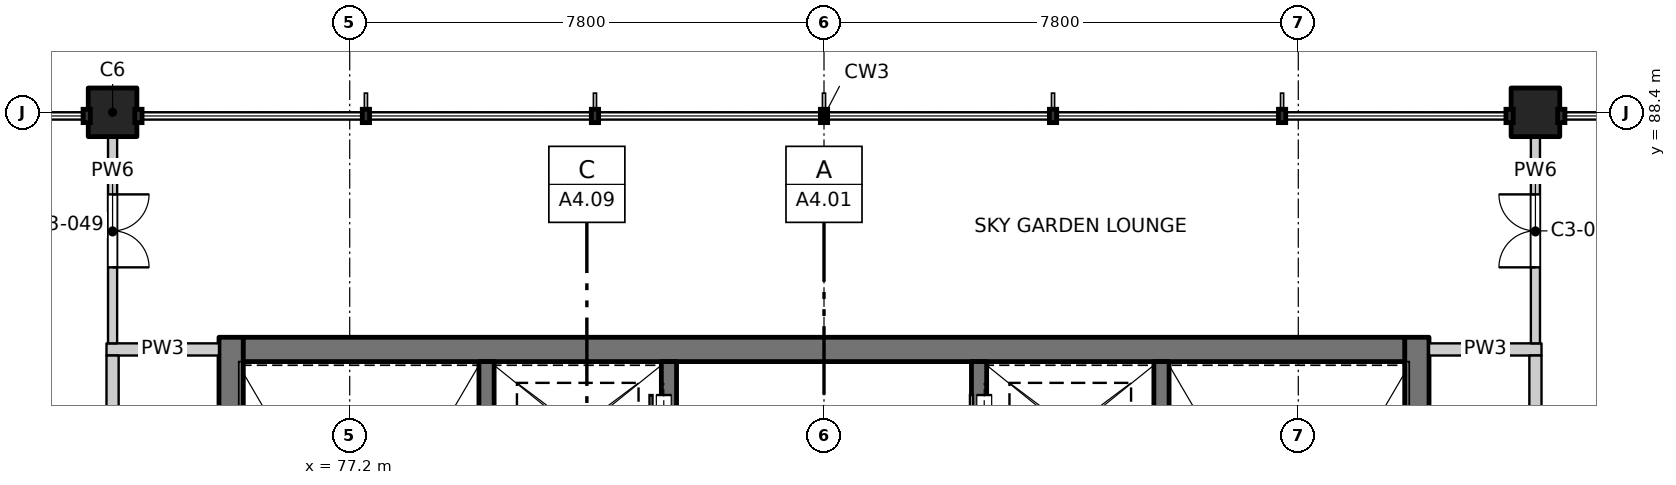
"""IFC4 building model, lengths in metres.
Left out: names, types, materials, properties, quantities, classifications, styles, units other than length and angle.
Written with IfcOpenShell. Run it as: python <this file> out.ifc"""

import sys

from ifc_helpers import new_model, si_unit, direction, frame, frame_2d, origin, origin_2d, place, context, subcontext, project, spatial, rectangle, extrude, element, fill, save


model = new_model("IFC4")
c1 = context("Model", 3, precision=1e-05, world=origin(), true_north=direction((0.0, 1.0)))
c2 = subcontext(c1, "Body", "Model", "MODEL_VIEW")
j1 = project(units=[si_unit("LENGTHUNIT", "METRE"), si_unit("PLANEANGLEUNIT", "RADIAN")], contexts=[c1])
p1 = place(None, origin())
s1 = spatial("IfcSite", under=j1, at=p1, CompositionType="ELEMENT")
p2 = place(p1, origin())
s2 = spatial("IfcBuilding", under=s1, at=p2, CompositionType="ELEMENT")
p3 = place(p2, frame((0.0, 0.0, 200.7)))
s3 = spatial("IfcBuildingStorey", under=s2, at=p3, CompositionType="ELEMENT", Elevation=200.7)
for number, where, z_axis, x_axis in (
    (1, (73.3, 88.4, -0.25), (0.0, 0.0, 1.0), (1.0, 0.0, 0.0)),
    (2, (96.7, 88.4, -0.25), (0.0, 0.0, 1.0), (1.0, 0.0, 0.0)),
):
    element("IfcColumn", number, at=place(p3, frame(where, z_axis=z_axis, x_axis=x_axis)), inside=s3, PredefinedType="COLUMN", context=c2, shape_type="SweptSolid", body=[
        extrude(rectangle(XDim=0.8, YDim=0.8, at=origin_2d()), origin(), (0.0, 0.0, 1.0), 3.4),
    ])
p4 = place(p3, frame((75.25, 77.3, -0.25), z_axis=(0.0, 0.0, 1.0), x_axis=(0.0, 1.0, 0.0)))
e3 = element("IfcWall", 3, at=p4, inside=s3, PredefinedType="SOLIDWALL", context=c2, shape_type="SweptSolid", body=[
    extrude(rectangle(XDim=7.4, YDim=0.4, at=frame_2d((3.7, 0.0))), origin(), (0.0, 0.0, 1.0), 3.4),
])
p5 = place(p4, frame((0.3, 0.0, 0.25)))
e4 = element("IfcOpeningElement", 4, at=p5, cuts=e3, PredefinedType="OPENING", context=c2, shape_type="SweptSolid", body=[
    extrude(rectangle(XDim=1.2, YDim=2.1, at=frame_2d((0.6, 1.05))), frame((0.0, 0.21, 0.0), z_axis=(0.0, -1.0, 0.0), x_axis=(1.0, 0.0, 0.0)), (0.0, 0.0, 1.0), 0.42),
])
p6 = place(p3, frame((94.75, 77.3, -0.25), z_axis=(0.0, 0.0, 1.0), x_axis=(0.0, 1.0, 0.0)))
e5 = element("IfcWall", 5, at=p6, inside=s3, PredefinedType="SOLIDWALL", context=c2, shape_type="SweptSolid", body=[
    extrude(rectangle(XDim=7.4, YDim=0.4, at=frame_2d((3.7, 0.0))), origin(), (0.0, 0.0, 1.0), 3.4),
])
p7 = place(p6, frame((0.3, 0.0, 0.25)))
e6 = element("IfcOpeningElement", 6, at=p7, cuts=e5, PredefinedType="OPENING", context=c2, shape_type="SweptSolid", body=[
    extrude(rectangle(XDim=1.2, YDim=2.1, at=frame_2d((0.6, 1.05))), frame((0.0, 0.21, 0.0), z_axis=(0.0, -1.0, 0.0), x_axis=(1.0, 0.0, 0.0)), (0.0, 0.0, 1.0), 0.42),
])
p8 = place(p3, frame((75.45, 84.5, -0.25), z_axis=(0.0, 0.0, 1.0), x_axis=(1.0, 0.0, 0.0)))
e7 = element("IfcWall", 7, at=p8, inside=s3, PredefinedType="SOLIDWALL", context=c2, shape_type="SweptSolid", body=[
    extrude(rectangle(XDim=19.1, YDim=0.4, at=frame_2d((9.55, 0.0))), origin(), (0.0, 0.0, 1.0), 3.4),
])
for number, where, z_axis, x_axis in (
    (8, (79.45, 77.3, -0.25), (0.0, 0.0, 1.0), (0.0, 1.0, 0.0)),
    (9, (90.55, 77.3, -0.25), (0.0, 0.0, 1.0), (0.0, 1.0, 0.0)),
):
    element("IfcWall", number, at=place(p3, frame(where, z_axis=z_axis, x_axis=x_axis)), inside=s3, PredefinedType="SOLIDWALL", context=c2, shape_type="SweptSolid", body=[
        extrude(rectangle(XDim=7.0, YDim=0.25, at=frame_2d((3.5, 0.0))), origin(), (0.0, 0.0, 1.0), 3.4),
    ])
p9 = place(p3, frame((82.45, 82.025, -0.25), z_axis=(0.0, 0.0, 1.0), x_axis=(0.0, 1.0, 0.0)))
e10 = element("IfcWall", 10, at=p9, inside=s3, PredefinedType="SOLIDWALL", context=c2, shape_type="SweptSolid", body=[
    extrude(rectangle(XDim=2.275, YDim=0.25, at=frame_2d((1.138, 0.0))), origin(), (0.0, 0.0, 1.0), 3.4),
])
p10 = place(p9, frame((0.625, 0.0, 0.25)))
e11 = element("IfcOpeningElement", 11, at=p10, cuts=e10, PredefinedType="OPENING", context=c2, shape_type="SweptSolid", body=[
    extrude(rectangle(XDim=1.1, YDim=2.1, at=frame_2d((0.55, 1.05))), frame((0.0, 0.135, 0.0), z_axis=(0.0, -1.0, 0.0), x_axis=(1.0, 0.0, 0.0)), (0.0, 0.0, 1.0), 0.27),
])
p11 = place(p3, frame((87.55, 82.025, -0.25), z_axis=(0.0, 0.0, 1.0), x_axis=(0.0, 1.0, 0.0)))
e12 = element("IfcWall", 12, at=p11, inside=s3, PredefinedType="SOLIDWALL", context=c2, shape_type="SweptSolid", body=[
    extrude(rectangle(XDim=2.275, YDim=0.25, at=frame_2d((1.138, 0.0))), origin(), (0.0, 0.0, 1.0), 3.4),
])
p12 = place(p11, frame((0.625, 0.0, 0.25)))
e13 = element("IfcOpeningElement", 13, at=p12, cuts=e12, PredefinedType="OPENING", context=c2, shape_type="SweptSolid", body=[
    extrude(rectangle(XDim=1.1, YDim=2.1, at=frame_2d((0.55, 1.05))), frame((0.0, 0.135, 0.0), z_axis=(0.0, -1.0, 0.0), x_axis=(1.0, 0.0, 0.0)), (0.0, 0.0, 1.0), 0.27),
])
for number, where, z_axis, x_axis in (
    (14, (73.2, 84.5, 0.0), (0.0, 0.0, 1.0), (1.0, 0.0, 0.0)),
    (15, (94.95, 84.5, 0.0), (0.0, 0.0, 1.0), (1.0, 0.0, 0.0)),
):
    element("IfcWall", number, at=place(p3, frame(where, z_axis=z_axis, x_axis=x_axis)), inside=s3, PredefinedType="PARTITIONING", context=c2, shape_type="SweptSolid", body=[
        extrude(rectangle(XDim=1.85, YDim=0.2, at=frame_2d((0.925, 0.0))), origin(), (0.0, 0.0, 1.0), 3.15),
    ])
p13 = place(p3, frame((73.3, 49.5, 0.0), z_axis=(0.0, 0.0, 1.0), x_axis=(0.0, 1.0, 0.0)))
e16 = element("IfcWall", 16, at=p13, inside=s3, PredefinedType="PARTITIONING", context=c2, shape_type="SweptSolid", body=[
    extrude(rectangle(XDim=34.9, YDim=0.2, at=frame_2d((17.45, 0.0))), origin(), (0.0, 0.0, 1.0), 3.15),
])
p14 = place(p13, frame((6.2, 0.0, 0.0)))
e17 = element("IfcOpeningElement", 17, at=p14, cuts=e16, PredefinedType="OPENING", context=c2, shape_type="SweptSolid", body=[
    extrude(rectangle(XDim=1.2, YDim=2.1, at=frame_2d((0.6, 1.05))), frame((0.0, 0.11, 0.0), z_axis=(0.0, -1.0, 0.0), x_axis=(1.0, 0.0, 0.0)), (0.0, 0.0, 1.0), 0.22),
])
p15 = place(p13, frame((12.95, 0.0, 0.0)))
e18 = element("IfcOpeningElement", 18, at=p15, cuts=e16, PredefinedType="OPENING", context=c2, shape_type="SweptSolid", body=[
    extrude(rectangle(XDim=1.2, YDim=2.1, at=frame_2d((0.6, 1.05))), frame((0.0, 0.11, 0.0), z_axis=(0.0, -1.0, 0.0), x_axis=(1.0, 0.0, 0.0)), (0.0, 0.0, 1.0), 0.22),
])
p16 = place(p13, frame((16.85, 0.0, 0.0)))
e19 = element("IfcOpeningElement", 19, at=p16, cuts=e16, PredefinedType="OPENING", context=c2, shape_type="SweptSolid", body=[
    extrude(rectangle(XDim=1.2, YDim=2.1, at=frame_2d((0.6, 1.05))), frame((0.0, 0.11, 0.0), z_axis=(0.0, -1.0, 0.0), x_axis=(1.0, 0.0, 0.0)), (0.0, 0.0, 1.0), 0.22),
])
p17 = place(p13, frame((28.55, 0.0, 0.0)))
e20 = element("IfcOpeningElement", 20, at=p17, cuts=e16, PredefinedType="OPENING", context=c2, shape_type="SweptSolid", body=[
    extrude(rectangle(XDim=1.2, YDim=2.1, at=frame_2d((0.6, 1.05))), frame((0.0, 0.11, 0.0), z_axis=(0.0, -1.0, 0.0), x_axis=(1.0, 0.0, 0.0)), (0.0, 0.0, 1.0), 0.22),
])
p18 = place(p3, frame((73.3, 84.6, 0.0), z_axis=(0.0, 0.0, 1.0), x_axis=(0.0, 1.0, 0.0)))
e21 = element("IfcWall", 21, at=p18, inside=s3, PredefinedType="PARTITIONING", context=c2, shape_type="SweptSolid", body=[
    extrude(rectangle(XDim=3.665, YDim=0.15, at=frame_2d((1.833, 0.0))), origin(), (0.0, 0.0, 1.0), 3.15),
])
p19 = place(p18, frame((1.25, 0.0, 0.0)))
e22 = element("IfcOpeningElement", 22, at=p19, cuts=e21, PredefinedType="OPENING", context=c2, shape_type="SweptSolid", body=[
    extrude(rectangle(XDim=1.2, YDim=2.1, at=frame_2d((0.6, 1.05))), frame((0.0, 0.085, 0.0), z_axis=(0.0, -1.0, 0.0), x_axis=(1.0, 0.0, 0.0)), (0.0, 0.0, 1.0), 0.17),
])
p20 = place(p3, frame((96.7, 49.5, 0.0), z_axis=(0.0, 0.0, 1.0), x_axis=(0.0, 1.0, 0.0)))
e23 = element("IfcWall", 23, at=p20, inside=s3, PredefinedType="PARTITIONING", context=c2, shape_type="SweptSolid", body=[
    extrude(rectangle(XDim=34.9, YDim=0.2, at=frame_2d((17.45, 0.0))), origin(), (0.0, 0.0, 1.0), 3.15),
])
p21 = place(p20, frame((6.2, 0.0, 0.0)))
e24 = element("IfcOpeningElement", 24, at=p21, cuts=e23, PredefinedType="OPENING", context=c2, shape_type="SweptSolid", body=[
    extrude(rectangle(XDim=1.2, YDim=2.1, at=frame_2d((0.6, 1.05))), frame((0.0, 0.11, 0.0), z_axis=(0.0, -1.0, 0.0), x_axis=(1.0, 0.0, 0.0)), (0.0, 0.0, 1.0), 0.22),
])
p22 = place(p20, frame((12.95, 0.0, 0.0)))
e25 = element("IfcOpeningElement", 25, at=p22, cuts=e23, PredefinedType="OPENING", context=c2, shape_type="SweptSolid", body=[
    extrude(rectangle(XDim=1.2, YDim=2.1, at=frame_2d((0.6, 1.05))), frame((0.0, 0.11, 0.0), z_axis=(0.0, -1.0, 0.0), x_axis=(1.0, 0.0, 0.0)), (0.0, 0.0, 1.0), 0.22),
])
p23 = place(p20, frame((18.7, 0.0, 0.0)))
e26 = element("IfcOpeningElement", 26, at=p23, cuts=e23, PredefinedType="OPENING", context=c2, shape_type="SweptSolid", body=[
    extrude(rectangle(XDim=1.2, YDim=2.1, at=frame_2d((0.6, 1.05))), frame((0.0, 0.11, 0.0), z_axis=(0.0, -1.0, 0.0), x_axis=(1.0, 0.0, 0.0)), (0.0, 0.0, 1.0), 0.22),
])
p24 = place(p20, frame((24.65, 0.0, 0.0)))
e27 = element("IfcOpeningElement", 27, at=p24, cuts=e23, PredefinedType="OPENING", context=c2, shape_type="SweptSolid", body=[
    extrude(rectangle(XDim=1.2, YDim=2.1, at=frame_2d((0.6, 1.05))), frame((0.0, 0.11, 0.0), z_axis=(0.0, -1.0, 0.0), x_axis=(1.0, 0.0, 0.0)), (0.0, 0.0, 1.0), 0.22),
])
p25 = place(p20, frame((32.45, 0.0, 0.0)))
e28 = element("IfcOpeningElement", 28, at=p25, cuts=e23, PredefinedType="OPENING", context=c2, shape_type="SweptSolid", body=[
    extrude(rectangle(XDim=1.2, YDim=2.1, at=frame_2d((0.6, 1.05))), frame((0.0, 0.11, 0.0), z_axis=(0.0, -1.0, 0.0), x_axis=(1.0, 0.0, 0.0)), (0.0, 0.0, 1.0), 0.22),
])
p26 = place(p3, frame((96.7, 84.6, 0.0), z_axis=(0.0, 0.0, 1.0), x_axis=(0.0, 1.0, 0.0)))
e29 = element("IfcWall", 29, at=p26, inside=s3, PredefinedType="PARTITIONING", context=c2, shape_type="SweptSolid", body=[
    extrude(rectangle(XDim=3.665, YDim=0.15, at=frame_2d((1.833, 0.0))), origin(), (0.0, 0.0, 1.0), 3.15),
])
p27 = place(p26, frame((1.25, 0.0, 0.0)))
e30 = element("IfcOpeningElement", 30, at=p27, cuts=e29, PredefinedType="OPENING", context=c2, shape_type="SweptSolid", body=[
    extrude(rectangle(XDim=1.2, YDim=2.1, at=frame_2d((0.6, 1.05))), frame((0.0, 0.085, 0.0), z_axis=(0.0, -1.0, 0.0), x_axis=(1.0, 0.0, 0.0)), (0.0, 0.0, 1.0), 0.17),
])
p28 = place(p10, origin())
e31 = element("IfcDoor", 31, at=p28, inside=s3, OperationType="SLIDING_TO_RIGHT", PredefinedType="DOOR", context=c2, shape_type="SweptSolid", body=[
    extrude(rectangle(XDim=1.1, YDim=2.1, at=frame_2d((0.55, 1.05))), frame((0.0, 0.11, 0.0), z_axis=(0.0, -1.0, 0.0), x_axis=(1.0, 0.0, 0.0)), (0.0, 0.0, 1.0), 0.05),
])
fill(e11, e31)
p29 = place(p12, origin())
e32 = element("IfcDoor", 32, at=p29, inside=s3, OperationType="SLIDING_TO_RIGHT", PredefinedType="DOOR", context=c2, shape_type="SweptSolid", body=[
    extrude(rectangle(XDim=1.1, YDim=2.1, at=frame_2d((0.55, 1.05))), frame((0.0, -0.06, 0.0), z_axis=(0.0, -1.0, 0.0), x_axis=(1.0, 0.0, 0.0)), (0.0, 0.0, 1.0), 0.05),
])
fill(e13, e32)
p30 = place(p19, origin())
e33 = element("IfcDoor", 33, at=p30, inside=s3, OperationType="DOUBLE_DOOR_SINGLE_SWING", PredefinedType="DOOR", context=c2, shape_type="SweptSolid", body=[
    extrude(rectangle(XDim=1.2, YDim=2.1, at=frame_2d((0.6, 1.05))), frame((0.0, 0.025, 0.0), z_axis=(0.0, -1.0, 0.0), x_axis=(1.0, 0.0, 0.0)), (0.0, 0.0, 1.0), 0.05),
])
fill(e22, e33)
p31 = place(p27, origin())
e34 = element("IfcDoor", 34, at=p31, inside=s3, OperationType="DOUBLE_DOOR_SINGLE_SWING", PredefinedType="DOOR", context=c2, shape_type="SweptSolid", body=[
    extrude(rectangle(XDim=1.2, YDim=2.1, at=frame_2d((0.6, 1.05))), frame((0.0, 0.025, 0.0), z_axis=(0.0, -1.0, 0.0), x_axis=(1.0, 0.0, 0.0)), (0.0, 0.0, 1.0), 0.05),
])
fill(e30, e34)
save(model, sys.argv[1])
